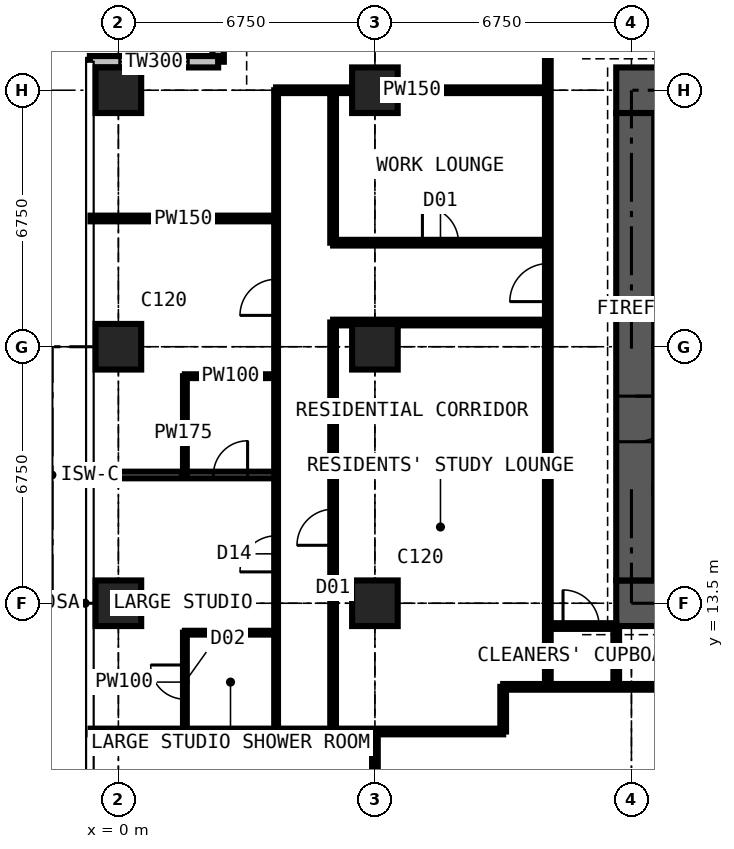
"""IFC4 building model, lengths in metres.
Left out: names, types, materials, properties, quantities, classifications, styles, units other than length and angle.
Written with IfcOpenShell. Run it as: python <this file> out.ifc"""

import sys

from ifc_helpers import new_model, si_unit, direction, frame, frame_2d, origin, origin_2d, place, context, subcontext, project, spatial, rectangle, extrude, element, fill, save


model = new_model("IFC4")
c1 = context("Model", 3, precision=1e-05, world=origin(), true_north=direction((0.0, 1.0)))
c2 = subcontext(c1, "Body", "Model", "MODEL_VIEW")
j1 = project(units=[si_unit("LENGTHUNIT", "METRE"), si_unit("PLANEANGLEUNIT", "RADIAN")], contexts=[c1])
p1 = place(None, origin())
s1 = spatial("IfcSite", under=j1, at=p1, CompositionType="ELEMENT")
p2 = place(p1, origin())
s2 = spatial("IfcBuilding", under=s1, at=p2, CompositionType="ELEMENT")
p3 = place(p2, frame((0.0, 0.0, 174.6)))
s3 = spatial("IfcBuildingStorey", under=s2, at=p3, CompositionType="ELEMENT", Elevation=174.6)
for number, where, z_axis, x_axis in (
    (1, (0.0, 13.5, 0.0), (0.0, 0.0, 1.0), (1.0, 0.0, 0.0)),
    (2, (0.0, 20.25, 0.0), (0.0, 0.0, 1.0), (1.0, 0.0, 0.0)),
    (3, (0.0, 27.0, 0.0), (0.0, 0.0, 1.0), (1.0, 0.0, 0.0)),
    (4, (6.75, 13.5, 0.0), (0.0, 0.0, 1.0), (1.0, 0.0, 0.0)),
    (5, (6.75, 20.25, 0.0), (0.0, 0.0, 1.0), (1.0, 0.0, 0.0)),
    (6, (6.75, 27.0, 0.0), (0.0, 0.0, 1.0), (1.0, 0.0, 0.0)),
):
    element("IfcColumn", number, at=place(p3, frame(where, z_axis=z_axis, x_axis=x_axis)), inside=s3, PredefinedType="COLUMN", context=c2, shape_type="SweptSolid", body=[
        extrude(rectangle(XDim=1.2, YDim=1.2, at=origin_2d()), origin(), (0.0, 0.0, 1.0), 3.6),
    ])
p4 = place(p3, frame((13.1, 13.5, 0.0), z_axis=(0.0, 0.0, 1.0), x_axis=(1.0, 0.0, 0.0)))
e7 = element("IfcWall", 7, at=p4, inside=s3, PredefinedType="SHEAR", context=c2, shape_type="SweptSolid", body=[
    extrude(rectangle(XDim=14.3, YDim=1.2, at=frame_2d((7.15, 0.0))), origin(), (0.0, 0.0, 1.0), 3.6),
])
p5 = place(p3, frame((27.4, 27.0, 0.0), z_axis=(0.0, 0.0, 1.0), x_axis=(-1.0, 0.0, 0.0)))
e8 = element("IfcWall", 8, at=p5, inside=s3, PredefinedType="SHEAR", context=c2, shape_type="SweptSolid", body=[
    extrude(rectangle(XDim=14.3, YDim=1.2, at=frame_2d((7.15, 0.0))), origin(), (0.0, 0.0, 1.0), 3.6),
])
p6 = place(p5, frame((5.225, 0.0, 0.0)))
e9 = element("IfcOpeningElement", 9, at=p6, cuts=e8, PredefinedType="OPENING", context=c2, shape_type="SweptSolid", body=[
    extrude(rectangle(XDim=0.9, YDim=2.2, at=frame_2d((0.45, 1.1))), frame((0.0, 0.61, 0.0), z_axis=(0.0, -1.0, 0.0), x_axis=(1.0, 0.0, 0.0)), (0.0, 0.0, 1.0), 1.22),
])
p7 = place(p5, frame((8.2, 0.0, 0.0)))
e10 = element("IfcOpeningElement", 10, at=p7, cuts=e8, PredefinedType="OPENING", context=c2, shape_type="SweptSolid", body=[
    extrude(rectangle(XDim=1.0, YDim=2.2, at=frame_2d((0.5, 1.1))), frame((0.0, 0.61, 0.0), z_axis=(0.0, -1.0, 0.0), x_axis=(1.0, 0.0, 0.0)), (0.0, 0.0, 1.0), 1.22),
])
p8 = place(p3, frame((13.6, 26.4, 0.0), z_axis=(0.0, 0.0, 1.0), x_axis=(0.0, -1.0, 0.0)))
e11 = element("IfcWall", 11, at=p8, inside=s3, PredefinedType="SHEAR", context=c2, shape_type="SweptSolid", body=[
    extrude(rectangle(XDim=12.3, YDim=1.0, at=frame_2d((6.15, 0.0))), origin(), (0.0, 0.0, 1.0), 3.6),
])
p9 = place(p8, frame((7.45, 0.0, 0.0)))
e12 = element("IfcOpeningElement", 12, at=p9, cuts=e11, PredefinedType="OPENING", context=c2, shape_type="SweptSolid", body=[
    extrude(rectangle(XDim=1.2, YDim=2.2, at=frame_2d((0.6, 1.1))), frame((0.0, 0.51, 0.0), z_axis=(0.0, -1.0, 0.0), x_axis=(1.0, 0.0, 0.0)), (0.0, 0.0, 1.0), 1.02),
])
p10 = place(p3, frame((2.625, 31.125, 0.0), z_axis=(0.0, 0.0, 1.0), x_axis=(0.0, -1.0, 0.0)))
e13 = element("IfcWall", 13, at=p10, inside=s3, PredefinedType="SOLIDWALL", context=c2, shape_type="SweptSolid", body=[
    extrude(rectangle(XDim=3.375, YDim=0.3, at=frame_2d((1.688, 0.0))), origin(), (0.0, 0.0, 1.0), 3.375),
])
p11 = place(p10, frame((0.788, 0.0, 0.6)))
e14 = element("IfcOpeningElement", 14, at=p11, cuts=e13, PredefinedType="OPENING", context=c2, shape_type="SweptSolid", body=[
    extrude(rectangle(XDim=1.8, YDim=2.1, at=frame_2d((0.9, 1.05))), frame((0.0, 0.16, 0.0), z_axis=(0.0, -1.0, 0.0), x_axis=(1.0, 0.0, 0.0)), (0.0, 0.0, 1.0), 0.32),
])
p12 = place(p3, frame((2.625, 27.75, 0.0), z_axis=(0.0, 0.0, 1.0), x_axis=(-1.0, 0.0, 0.0)))
e15 = element("IfcWall", 15, at=p12, inside=s3, PredefinedType="SOLIDWALL", context=c2, shape_type="SweptSolid", body=[
    extrude(rectangle(XDim=3.375, YDim=0.3, at=frame_2d((1.688, 0.0))), origin(), (0.0, 0.0, 1.0), 3.375),
])
p13 = place(p12, frame((0.788, 0.0, 0.6)))
e16 = element("IfcOpeningElement", 16, at=p13, cuts=e15, PredefinedType="OPENING", context=c2, shape_type="SweptSolid", body=[
    extrude(rectangle(XDim=1.8, YDim=2.1, at=frame_2d((0.9, 1.05))), frame((0.0, 0.16, 0.0), z_axis=(0.0, -1.0, 0.0), x_axis=(1.0, 0.0, 0.0)), (0.0, 0.0, 1.0), 0.32),
])
p14 = place(p3, frame((-0.734, 10.125, 0.0), z_axis=(0.0, 0.0, 1.0), x_axis=(1.0, 0.0, 0.0)))
e17 = element("IfcWall", 17, at=p14, inside=s3, PredefinedType="PARTITIONING", context=c2, shape_type="SweptSolid", body=[
    extrude(rectangle(XDim=10.859, YDim=0.15, at=frame_2d((5.429, 0.0))), origin(), (0.0, 0.0, 1.0), 3.375),
])
p15 = place(p3, frame((-0.734, 16.875, 0.0), z_axis=(0.0, 0.0, 1.0), x_axis=(1.0, 0.0, 0.0)))
e18 = element("IfcWall", 18, at=p15, inside=s3, PredefinedType="PARTITIONING", context=c2, shape_type="SweptSolid", body=[
    extrude(rectangle(XDim=4.884, YDim=0.175, at=frame_2d((2.442, 0.0))), origin(), (0.0, 0.0, 1.0), 3.375),
])
p16 = place(p15, frame((3.234, 0.0, 0.0)))
e19 = element("IfcOpeningElement", 19, at=p16, cuts=e18, PredefinedType="OPENING", context=c2, shape_type="SweptSolid", body=[
    extrude(rectangle(XDim=0.9, YDim=2.2, at=frame_2d((0.45, 1.1))), frame((0.0, 0.097, 0.0), z_axis=(0.0, -1.0, 0.0), x_axis=(1.0, 0.0, 0.0)), (0.0, 0.0, 1.0), 0.195),
])
p17 = place(p3, frame((-0.734, 23.625, 0.0), z_axis=(0.0, 0.0, 1.0), x_axis=(1.0, 0.0, 0.0)))
e20 = element("IfcWall", 20, at=p17, inside=s3, PredefinedType="PARTITIONING", context=c2, shape_type="SweptSolid", body=[
    extrude(rectangle(XDim=4.884, YDim=0.15, at=frame_2d((2.442, 0.0))), origin(), (0.0, 0.0, 1.0), 3.375),
])
p18 = place(p3, frame((1.75, 10.125, 0.0), z_axis=(0.0, 0.0, 1.0), x_axis=(0.0, 1.0, 0.0)))
e21 = element("IfcWall", 21, at=p18, inside=s3, PredefinedType="PARTITIONING", context=c2, shape_type="SweptSolid", body=[
    extrude(rectangle(XDim=2.6, YDim=0.1, at=frame_2d((1.3, 0.0))), origin(), (0.0, 0.0, 1.0), 3.375),
])
p19 = place(p18, frame((0.85, 0.0, 0.0)))
e22 = element("IfcOpeningElement", 22, at=p19, cuts=e21, PredefinedType="OPENING", context=c2, shape_type="SweptSolid", body=[
    extrude(rectangle(XDim=0.9, YDim=2.2, at=frame_2d((0.45, 1.1))), frame((0.0, 0.06, 0.0), z_axis=(0.0, -1.0, 0.0), x_axis=(1.0, 0.0, 0.0)), (0.0, 0.0, 1.0), 0.12),
])
p20 = place(p3, frame((1.75, 12.725, 0.0), z_axis=(0.0, 0.0, 1.0), x_axis=(1.0, 0.0, 0.0)))
e23 = element("IfcWall", 23, at=p20, inside=s3, PredefinedType="PARTITIONING", context=c2, shape_type="SweptSolid", body=[
    extrude(rectangle(XDim=2.4, YDim=0.1, at=frame_2d((1.2, 0.0))), origin(), (0.0, 0.0, 1.0), 3.375),
])
p21 = place(p3, frame((1.75, 16.875, 0.0), z_axis=(0.0, 0.0, 1.0), x_axis=(0.0, 1.0, 0.0)))
e24 = element("IfcWall", 24, at=p21, inside=s3, PredefinedType="PARTITIONING", context=c2, shape_type="SweptSolid", body=[
    extrude(rectangle(XDim=2.6, YDim=0.1, at=frame_2d((1.3, 0.0))), origin(), (0.0, 0.0, 1.0), 3.375),
])
p22 = place(p3, frame((1.75, 19.475, 0.0), z_axis=(0.0, 0.0, 1.0), x_axis=(1.0, 0.0, 0.0)))
e25 = element("IfcWall", 25, at=p22, inside=s3, PredefinedType="PARTITIONING", context=c2, shape_type="SweptSolid", body=[
    extrude(rectangle(XDim=2.4, YDim=0.1, at=frame_2d((1.2, 0.0))), origin(), (0.0, 0.0, 1.0), 3.375),
])
p23 = place(p3, frame((4.15, 10.125, 0.0), z_axis=(0.0, 0.0, 1.0), x_axis=(0.0, 1.0, 0.0)))
e26 = element("IfcWall", 26, at=p23, inside=s3, PredefinedType="PARTITIONING", context=c2, shape_type="SweptSolid", body=[
    extrude(rectangle(XDim=16.875, YDim=0.1, at=frame_2d((8.438, 0.0))), origin(), (0.0, 0.0, 1.0), 3.375),
])
p24 = place(p23, frame((4.2, 0.0, 0.0)))
e27 = element("IfcOpeningElement", 27, at=p24, cuts=e26, PredefinedType="OPENING", context=c2, shape_type="SweptSolid", body=[
    extrude(rectangle(XDim=0.95, YDim=2.2, at=frame_2d((0.475, 1.1))), frame((0.0, 0.06, 0.0), z_axis=(0.0, -1.0, 0.0), x_axis=(1.0, 0.0, 0.0)), (0.0, 0.0, 1.0), 0.12),
])
p25 = place(p23, frame((10.95, 0.0, 0.0)))
e28 = element("IfcOpeningElement", 28, at=p25, cuts=e26, PredefinedType="OPENING", context=c2, shape_type="SweptSolid", body=[
    extrude(rectangle(XDim=0.95, YDim=2.2, at=frame_2d((0.475, 1.1))), frame((0.0, 0.06, 0.0), z_axis=(0.0, -1.0, 0.0), x_axis=(1.0, 0.0, 0.0)), (0.0, 0.0, 1.0), 0.12),
])
p26 = place(p3, frame((4.15, 27.0, 0.0), z_axis=(0.0, 0.0, 1.0), x_axis=(1.0, 0.0, 0.0)))
e29 = element("IfcWall", 29, at=p26, inside=s3, PredefinedType="PARTITIONING", context=c2, shape_type="SweptSolid", body=[
    extrude(rectangle(XDim=7.15, YDim=0.15, at=frame_2d((3.575, 0.0))), origin(), (0.0, 0.0, 1.0), 2.806),
])
p27 = place(p3, frame((5.65, 10.125, 0.0), z_axis=(0.0, 0.0, 1.0), x_axis=(0.0, 1.0, 0.0)))
e30 = element("IfcWall", 30, at=p27, inside=s3, PredefinedType="PARTITIONING", context=c2, shape_type="SweptSolid", body=[
    extrude(rectangle(XDim=10.762, YDim=0.15, at=frame_2d((5.381, 0.0))), origin(), (0.0, 0.0, 1.0), 3.375),
])
p28 = place(p27, frame((4.9, 0.0, 0.0)))
e31 = element("IfcOpeningElement", 31, at=p28, cuts=e30, PredefinedType="OPENING", context=c2, shape_type="SweptSolid", body=[
    extrude(rectangle(XDim=0.95, YDim=2.2, at=frame_2d((0.475, 1.1))), frame((0.0, 0.085, 0.0), z_axis=(0.0, -1.0, 0.0), x_axis=(1.0, 0.0, 0.0)), (0.0, 0.0, 1.0), 0.17),
])
p29 = place(p3, frame((5.65, 20.887, 0.0), z_axis=(0.0, 0.0, 1.0), x_axis=(1.0, 0.0, 0.0)))
e32 = element("IfcWall", 32, at=p29, inside=s3, PredefinedType="PARTITIONING", context=c2, shape_type="SweptSolid", body=[
    extrude(rectangle(XDim=5.65, YDim=0.15, at=frame_2d((2.825, 0.0))), origin(), (0.0, 0.0, 1.0), 3.375),
])
p30 = place(p3, frame((5.65, 22.988, 0.0), z_axis=(0.0, 0.0, 1.0), x_axis=(0.0, 1.0, 0.0)))
e33 = element("IfcWall", 33, at=p30, inside=s3, PredefinedType="PARTITIONING", context=c2, shape_type="SweptSolid", body=[
    extrude(rectangle(XDim=4.012, YDim=0.15, at=frame_2d((2.006, 0.0))), origin(), (0.0, 0.0, 1.0), 3.375),
])
p31 = place(p3, frame((5.65, 22.988, 0.0), z_axis=(0.0, 0.0, 1.0), x_axis=(1.0, 0.0, 0.0)))
e34 = element("IfcWall", 34, at=p31, inside=s3, PredefinedType="PARTITIONING", context=c2, shape_type="SweptSolid", body=[
    extrude(rectangle(XDim=5.65, YDim=0.15, at=frame_2d((2.825, 0.0))), origin(), (0.0, 0.0, 1.0), 3.375),
])
p32 = place(p31, frame((2.35, 0.0, 0.0)))
e35 = element("IfcOpeningElement", 35, at=p32, cuts=e34, PredefinedType="OPENING", context=c2, shape_type="SweptSolid", body=[
    extrude(rectangle(XDim=0.95, YDim=2.2, at=frame_2d((0.475, 1.1))), frame((0.0, 0.085, 0.0), z_axis=(0.0, -1.0, 0.0), x_axis=(1.0, 0.0, 0.0)), (0.0, 0.0, 1.0), 0.17),
])
p33 = place(p3, frame((6.75, 4.15, 0.0), z_axis=(0.0, 0.0, 1.0), x_axis=(0.0, 1.0, 0.0)))
e36 = element("IfcWall", 36, at=p33, inside=s3, PredefinedType="PARTITIONING", context=c2, shape_type="SweptSolid", body=[
    extrude(rectangle(XDim=5.975, YDim=0.15, at=frame_2d((2.988, 0.0))), origin(), (0.0, 0.0, 1.0), 2.877),
])
p34 = place(p3, frame((10.125, 10.125, 0.0), z_axis=(0.0, 0.0, 1.0), x_axis=(0.0, 1.0, 0.0)))
e37 = element("IfcWall", 37, at=p34, inside=s3, PredefinedType="PARTITIONING", context=c2, shape_type="SweptSolid", body=[
    extrude(rectangle(XDim=1.175, YDim=0.15, at=frame_2d((0.587, 0.0))), origin(), (0.0, 0.0, 1.0), 3.375),
])
p35 = place(p3, frame((10.125, 11.3, 0.0), z_axis=(0.0, 0.0, 1.0), x_axis=(1.0, 0.0, 0.0)))
e38 = element("IfcWall", 38, at=p35, inside=s3, PredefinedType="PARTITIONING", context=c2, shape_type="SweptSolid", body=[
    extrude(rectangle(XDim=20.475, YDim=0.15, at=frame_2d((10.238, 0.0))), origin(), (0.0, 0.0, 1.0), 3.375),
])
p36 = place(p35, frame((8.425, 0.0, 0.0)))
e39 = element("IfcOpeningElement", 39, at=p36, cuts=e38, PredefinedType="OPENING", context=c2, shape_type="SweptSolid", body=[
    extrude(rectangle(XDim=1.0, YDim=2.2, at=frame_2d((0.5, 1.1))), frame((0.0, 0.085, 0.0), z_axis=(0.0, -1.0, 0.0), x_axis=(1.0, 0.0, 0.0)), (0.0, 0.0, 1.0), 0.17),
])
p37 = place(p35, frame((10.975, 0.0, 0.0)))
e40 = element("IfcOpeningElement", 40, at=p37, cuts=e38, PredefinedType="OPENING", context=c2, shape_type="SweptSolid", body=[
    extrude(rectangle(XDim=1.0, YDim=2.2, at=frame_2d((0.5, 1.1))), frame((0.0, 0.085, 0.0), z_axis=(0.0, -1.0, 0.0), x_axis=(1.0, 0.0, 0.0)), (0.0, 0.0, 1.0), 0.17),
])
p38 = place(p35, frame((4.875, 0.0, 0.0)))
e41 = element("IfcOpeningElement", 41, at=p38, cuts=e38, PredefinedType="OPENING", context=c2, shape_type="SweptSolid", body=[
    extrude(rectangle(XDim=0.95, YDim=2.2, at=frame_2d((0.475, 1.1))), frame((0.0, 0.085, 0.0), z_axis=(0.0, -1.0, 0.0), x_axis=(1.0, 0.0, 0.0)), (0.0, 0.0, 1.0), 0.17),
])
p39 = place(p3, frame((11.3, 11.3, 0.0), z_axis=(0.0, 0.0, 1.0), x_axis=(0.0, 1.0, 0.0)))
e42 = element("IfcWall", 42, at=p39, inside=s3, PredefinedType="PARTITIONING", context=c2, shape_type="SweptSolid", body=[
    extrude(rectangle(XDim=19.3, YDim=0.15, at=frame_2d((9.65, 0.0))), origin(), (0.0, 0.0, 1.0), 3.375),
])
p40 = place(p39, frame((18.1, 0.0, 0.0)))
e43 = element("IfcOpeningElement", 43, at=p40, cuts=e42, PredefinedType="OPENING", context=c2, shape_type="SweptSolid", body=[
    extrude(rectangle(XDim=1.0, YDim=2.2, at=frame_2d((0.5, 1.1))), frame((0.0, 0.085, 0.0), z_axis=(0.0, -1.0, 0.0), x_axis=(1.0, 0.0, 0.0)), (0.0, 0.0, 1.0), 0.17),
])
p41 = place(p39, frame((10.137, 0.0, 0.0)))
e44 = element("IfcOpeningElement", 44, at=p41, cuts=e42, PredefinedType="OPENING", context=c2, shape_type="SweptSolid", body=[
    extrude(rectangle(XDim=1.0, YDim=2.2, at=frame_2d((0.5, 1.1))), frame((0.0, 0.085, 0.0), z_axis=(0.0, -1.0, 0.0), x_axis=(1.0, 0.0, 0.0)), (0.0, 0.0, 1.0), 0.17),
])
p42 = place(p3, frame((11.3, 12.9, 0.0), z_axis=(0.0, 0.0, 1.0), x_axis=(1.0, 0.0, 0.0)))
e45 = element("IfcWall", 45, at=p42, inside=s3, PredefinedType="PARTITIONING", context=c2, shape_type="SweptSolid", body=[
    extrude(rectangle(XDim=1.8, YDim=0.15, at=frame_2d((0.9, 0.0))), origin(), (0.0, 0.0, 1.0), 2.806),
])
p43 = place(p42, frame((0.4, 0.0, 0.0)))
e46 = element("IfcOpeningElement", 46, at=p43, cuts=e45, PredefinedType="OPENING", context=c2, shape_type="SweptSolid", body=[
    extrude(rectangle(XDim=0.95, YDim=2.2, at=frame_2d((0.475, 1.1))), frame((0.0, 0.085, 0.0), z_axis=(0.0, -1.0, 0.0), x_axis=(1.0, 0.0, 0.0)), (0.0, 0.0, 1.0), 0.17),
])
p44 = place(p3, frame((13.1, 11.3, 0.0), z_axis=(0.0, 0.0, 1.0), x_axis=(0.0, 1.0, 0.0)))
e47 = element("IfcWall", 47, at=p44, inside=s3, PredefinedType="PARTITIONING", context=c2, shape_type="SweptSolid", body=[
    extrude(rectangle(XDim=1.6, YDim=0.15, at=frame_2d((0.8, 0.0))), origin(), (0.0, 0.0, 1.0), 3.375),
])
p45 = place(p13, origin())
e48 = element("IfcWindow", 48, at=p45, inside=s3, PartitioningType="SINGLE_PANEL", PredefinedType="WINDOW", context=c2, shape_type="SweptSolid", body=[
    extrude(rectangle(XDim=1.8, YDim=2.1, at=frame_2d((0.9, 1.05))), frame((0.0, 0.03, 0.0), z_axis=(0.0, -1.0, 0.0), x_axis=(1.0, 0.0, 0.0)), (0.0, 0.0, 1.0), 0.06),
])
fill(e16, e48)
p46 = place(p9, origin())
e49 = element("IfcDoor", 49, at=p46, inside=s3, OperationType="DOUBLE_DOOR_SINGLE_SWING", PredefinedType="DOOR", context=c2, shape_type="SweptSolid", body=[
    extrude(rectangle(XDim=1.2, YDim=2.2, at=frame_2d((0.6, 1.1))), frame((0.0, 0.025, 0.0), z_axis=(0.0, -1.0, 0.0), x_axis=(1.0, 0.0, 0.0)), (0.0, 0.0, 1.0), 0.05),
])
fill(e12, e49)
p47 = place(p43, origin())
e50 = element("IfcDoor", 50, at=p47, inside=s3, OperationType="SINGLE_SWING_LEFT", PredefinedType="DOOR", context=c2, shape_type="SweptSolid", body=[
    extrude(rectangle(XDim=0.95, YDim=2.2, at=frame_2d((0.475, 1.1))), frame((0.0, 0.025, 0.0), z_axis=(0.0, -1.0, 0.0), x_axis=(1.0, 0.0, 0.0)), (0.0, 0.0, 1.0), 0.05),
])
fill(e46, e50)
p48 = place(p24, origin())
e51 = element("IfcDoor", 51, at=p48, inside=s3, OperationType="SINGLE_SWING_LEFT", PredefinedType="DOOR", context=c2, shape_type="SweptSolid", body=[
    extrude(rectangle(XDim=0.95, YDim=2.2, at=frame_2d((0.475, 1.1))), frame((0.0, 0.025, 0.0), z_axis=(0.0, -1.0, 0.0), x_axis=(1.0, 0.0, 0.0)), (0.0, 0.0, 1.0), 0.05),
])
fill(e27, e51)
p49 = place(p19, origin())
e52 = element("IfcDoor", 52, at=p49, inside=s3, OperationType="SINGLE_SWING_RIGHT", PredefinedType="DOOR", context=c2, shape_type="SweptSolid", body=[
    extrude(rectangle(XDim=0.9, YDim=2.2, at=frame_2d((0.45, 1.1))), frame((0.0, 0.025, 0.0), z_axis=(0.0, -1.0, 0.0), x_axis=(1.0, 0.0, 0.0)), (0.0, 0.0, 1.0), 0.05),
])
fill(e22, e52)
p50 = place(p25, origin())
e53 = element("IfcDoor", 53, at=p50, inside=s3, OperationType="SINGLE_SWING_LEFT", PredefinedType="DOOR", context=c2, shape_type="SweptSolid", body=[
    extrude(rectangle(XDim=0.95, YDim=2.2, at=frame_2d((0.475, 1.1))), frame((0.0, 0.025, 0.0), z_axis=(0.0, -1.0, 0.0), x_axis=(1.0, 0.0, 0.0)), (0.0, 0.0, 1.0), 0.05),
])
fill(e28, e53)
p51 = place(p16, origin())
e54 = element("IfcDoor", 54, at=p51, inside=s3, OperationType="SINGLE_SWING_RIGHT", PredefinedType="DOOR", context=c2, shape_type="SweptSolid", body=[
    extrude(rectangle(XDim=0.9, YDim=2.2, at=frame_2d((0.45, 1.1))), frame((0.0, 0.025, 0.0), z_axis=(0.0, -1.0, 0.0), x_axis=(1.0, 0.0, 0.0)), (0.0, 0.0, 1.0), 0.05),
])
fill(e19, e54)
p52 = place(p41, origin())
e55 = element("IfcDoor", 55, at=p52, inside=s3, OperationType="SINGLE_SWING_LEFT", PredefinedType="DOOR", context=c2, shape_type="SweptSolid", body=[
    extrude(rectangle(XDim=1.0, YDim=2.2, at=frame_2d((0.5, 1.1))), frame((0.0, 0.025, 0.0), z_axis=(0.0, -1.0, 0.0), x_axis=(1.0, 0.0, 0.0)), (0.0, 0.0, 1.0), 0.05),
])
fill(e44, e55)
p53 = place(p28, origin())
e56 = element("IfcDoor", 56, at=p53, inside=s3, OperationType="SINGLE_SWING_LEFT", PredefinedType="DOOR", context=c2, shape_type="SweptSolid", body=[
    extrude(rectangle(XDim=0.95, YDim=2.2, at=frame_2d((0.475, 1.1))), frame((0.0, 0.025, 0.0), z_axis=(0.0, -1.0, 0.0), x_axis=(1.0, 0.0, 0.0)), (0.0, 0.0, 1.0), 0.05),
])
fill(e31, e56)
p54 = place(p32, origin())
e57 = element("IfcDoor", 57, at=p54, inside=s3, OperationType="SINGLE_SWING_LEFT", PredefinedType="DOOR", context=c2, shape_type="SweptSolid", body=[
    extrude(rectangle(XDim=0.95, YDim=2.2, at=frame_2d((0.475, 1.1))), frame((0.0, 0.025, 0.0), z_axis=(0.0, -1.0, 0.0), x_axis=(1.0, 0.0, 0.0)), (0.0, 0.0, 1.0), 0.05),
])
fill(e35, e57)
save(model, sys.argv[1])
